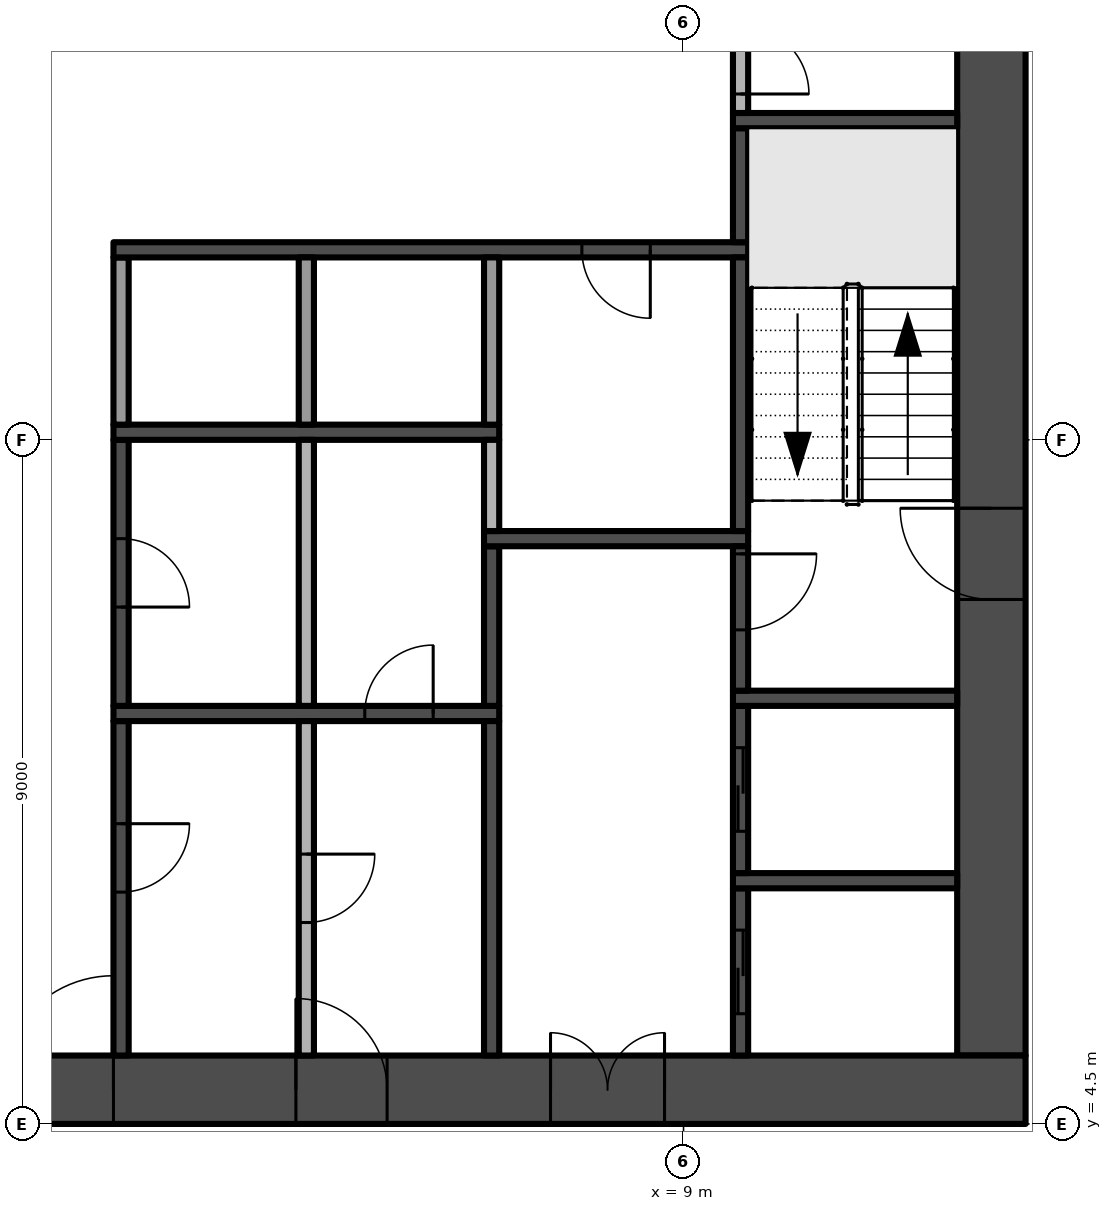
"""IFC4 building model, lengths in metres.
Left out: names, types, materials, properties, quantities, classifications, styles, units other than length and angle.
Written with IfcOpenShell. Run it as: python <this file> out.ifc"""

import sys

from ifc_helpers import new_model, si_unit, direction, frame, frame_2d, origin, place, context, subcontext, project, spatial, rectangle, extrude, element, fill, save


model = new_model("IFC4")
c1 = context("Model", 3, precision=1e-05, world=origin(), true_north=direction((0.0, 1.0)))
c2 = subcontext(c1, "Body", "Model", "MODEL_VIEW")
j1 = project(units=[si_unit("LENGTHUNIT", "METRE"), si_unit("PLANEANGLEUNIT", "RADIAN")], contexts=[c1])
p1 = place(None, origin())
s1 = spatial("IfcSite", under=j1, at=p1, CompositionType="ELEMENT")
p2 = place(p1, origin())
s2 = spatial("IfcBuilding", under=s1, at=p2, CompositionType="ELEMENT")
p3 = place(p2, frame((0.0, 0.0, 37.8)))
s3 = spatial("IfcBuildingStorey", under=s2, at=p3, CompositionType="ELEMENT", Elevation=37.8)
p4 = place(p3, frame((-13.5, 4.95, -0.3), z_axis=(0.0, 0.0, 1.0), x_axis=(1.0, 0.0, 0.0)))
e1 = element("IfcWall", 1, at=p4, inside=s3, PredefinedType="SHEAR", context=c2, shape_type="SweptSolid", body=[
    extrude(rectangle(XDim=27.0, YDim=0.9, at=frame_2d((13.5, 0.0))), origin(), (0.0, 0.0, 1.0), 3.8),
])
p5 = place(p4, frame((12.0, 0.0, 0.3)))
e2 = element("IfcOpeningElement", 2, at=p5, cuts=e1, PredefinedType="OPENING", context=c2, shape_type="SweptSolid", body=[
    extrude(rectangle(XDim=3.0, YDim=2.4, at=frame_2d((1.5, 1.2))), frame((0.0, 0.46, 0.0), z_axis=(0.0, -1.0, 0.0), x_axis=(1.0, 0.0, 0.0)), (0.0, 0.0, 1.0), 0.92),
])
p6 = place(p4, frame((4.9, 0.0, 0.3)))
e3 = element("IfcOpeningElement", 3, at=p6, cuts=e1, PredefinedType="OPENING", context=c2, shape_type="SweptSolid", body=[
    extrude(rectangle(XDim=1.2, YDim=2.2, at=frame_2d((0.6, 1.1))), frame((0.0, 0.46, 0.0), z_axis=(0.0, -1.0, 0.0), x_axis=(1.0, 0.0, 0.0)), (0.0, 0.0, 1.0), 0.92),
])
p7 = place(p4, frame((20.75, 0.0, 0.3)))
e4 = element("IfcOpeningElement", 4, at=p7, cuts=e1, PredefinedType="OPENING", context=c2, shape_type="SweptSolid", body=[
    extrude(rectangle(XDim=1.5, YDim=2.2, at=frame_2d((0.75, 1.1))), frame((0.0, 0.46, 0.0), z_axis=(0.0, -1.0, 0.0), x_axis=(1.0, 0.0, 0.0)), (0.0, 0.0, 1.0), 0.92),
])
p8 = place(p4, frame((17.4, 0.0, 0.3)))
e5 = element("IfcOpeningElement", 5, at=p8, cuts=e1, PredefinedType="OPENING", context=c2, shape_type="SweptSolid", body=[
    extrude(rectangle(XDim=1.2, YDim=2.2, at=frame_2d((0.6, 1.1))), frame((0.0, 0.46, 0.0), z_axis=(0.0, -1.0, 0.0), x_axis=(1.0, 0.0, 0.0)), (0.0, 0.0, 1.0), 0.92),
])
p9 = place(p3, frame((13.05, 5.4, -0.3), z_axis=(0.0, 0.0, 1.0), x_axis=(0.0, 1.0, 0.0)))
e6 = element("IfcWall", 6, at=p9, inside=s3, PredefinedType="SHEAR", context=c2, shape_type="SweptSolid", body=[
    extrude(rectangle(XDim=16.2, YDim=0.9, at=frame_2d((8.1, 0.0))), origin(), (0.0, 0.0, 1.0), 3.8),
])
p10 = place(p9, frame((6.0, 0.0, 0.3)))
e7 = element("IfcOpeningElement", 7, at=p10, cuts=e6, PredefinedType="OPENING", context=c2, shape_type="SweptSolid", body=[
    extrude(rectangle(XDim=1.2, YDim=2.2, at=frame_2d((0.6, 1.1))), frame((0.0, 0.46, 0.0), z_axis=(0.0, -1.0, 0.0), x_axis=(1.0, 0.0, 0.0)), (0.0, 0.0, 1.0), 0.92),
])
p11 = place(p3, frame((1.6, 9.8, 0.0), z_axis=(0.0, 0.0, 1.0), x_axis=(0.0, -1.0, 0.0)))
e8 = element("IfcWall", 8, at=p11, inside=s3, PredefinedType="SHEAR", context=c2, shape_type="SweptSolid", body=[
    extrude(rectangle(XDim=4.4, YDim=0.2, at=frame_2d((2.2, 0.0))), origin(), (0.0, 0.0, 1.0), 3.5),
])
p12 = place(p11, frame((1.35, 0.0, 0.0)))
e9 = element("IfcOpeningElement", 9, at=p12, cuts=e8, PredefinedType="OPENING", context=c2, shape_type="SweptSolid", body=[
    extrude(rectangle(XDim=0.9, YDim=2.1, at=frame_2d((0.45, 1.05))), frame((0.0, 0.11, 0.0), z_axis=(0.0, -1.0, 0.0), x_axis=(1.0, 0.0, 0.0)), (0.0, 0.0, 1.0), 0.22),
])
p13 = place(p3, frame((1.5, 9.9, 0.0), z_axis=(0.0, 0.0, 1.0), x_axis=(1.0, 0.0, 0.0)))
e10 = element("IfcWall", 10, at=p13, inside=s3, PredefinedType="SHEAR", context=c2, shape_type="SweptSolid", body=[
    extrude(rectangle(XDim=5.075, YDim=0.2, at=frame_2d((2.538, 0.0))), origin(), (0.0, 0.0, 1.0), 3.5),
])
p14 = place(p13, frame((3.306, 0.0, 0.0)))
e11 = element("IfcOpeningElement", 11, at=p14, cuts=e10, PredefinedType="OPENING", context=c2, shape_type="SweptSolid", body=[
    extrude(rectangle(XDim=0.9, YDim=2.1, at=frame_2d((0.45, 1.05))), frame((0.0, 0.11, 0.0), z_axis=(0.0, -1.0, 0.0), x_axis=(1.0, 0.0, 0.0)), (0.0, 0.0, 1.0), 0.22),
])
p15 = place(p3, frame((1.6, 13.5, 0.0), z_axis=(0.0, 0.0, 1.0), x_axis=(0.0, -1.0, 0.0)))
e12 = element("IfcWall", 12, at=p15, inside=s3, PredefinedType="SHEAR", context=c2, shape_type="SweptSolid", body=[
    extrude(rectangle(XDim=3.5, YDim=0.2, at=frame_2d((1.75, 0.0))), origin(), (0.0, 0.0, 1.0), 3.5),
])
p16 = place(p15, frame((1.3, 0.0, 0.0)))
e13 = element("IfcOpeningElement", 13, at=p16, cuts=e12, PredefinedType="OPENING", context=c2, shape_type="SweptSolid", body=[
    extrude(rectangle(XDim=0.9, YDim=2.1, at=frame_2d((0.45, 1.05))), frame((0.0, 0.11, 0.0), z_axis=(0.0, -1.0, 0.0), x_axis=(1.0, 0.0, 0.0)), (0.0, 0.0, 1.0), 0.22),
])
p17 = place(p3, frame((1.5, 13.6, 0.0), z_axis=(0.0, 0.0, 1.0), x_axis=(1.0, 0.0, 0.0)))
e14 = element("IfcWall", 14, at=p17, inside=s3, PredefinedType="SHEAR", context=c2, shape_type="SweptSolid", body=[
    extrude(rectangle(XDim=5.075, YDim=0.2, at=frame_2d((2.538, 0.0))), origin(), (0.0, 0.0, 1.0), 3.5),
])
p18 = place(p3, frame((1.6, 13.7, 0.0), z_axis=(0.0, 0.0, 1.0), x_axis=(0.0, 1.0, 0.0)))
e15 = element("IfcWall", 15, at=p18, inside=s3, PredefinedType="PARTITIONING", context=c2, shape_type="SweptSolid", body=[
    extrude(rectangle(XDim=2.2, YDim=0.2, at=frame_2d((1.1, 0.0))), origin(), (0.0, 0.0, 1.0), 3.5),
])
p19 = place(p3, frame((9.85, 16.0, 0.0), z_axis=(0.0, 0.0, 1.0), x_axis=(-1.0, 0.0, 0.0)))
e16 = element("IfcWall", 16, at=p19, inside=s3, PredefinedType="SHEAR", context=c2, shape_type="SweptSolid", body=[
    extrude(rectangle(XDim=8.35, YDim=0.2, at=frame_2d((4.175, 0.0))), origin(), (0.0, 0.0, 1.0), 3.5),
])
p20 = place(p19, frame((1.288, 0.0, 0.0)))
e17 = element("IfcOpeningElement", 17, at=p20, cuts=e16, PredefinedType="OPENING", context=c2, shape_type="SweptSolid", body=[
    extrude(rectangle(XDim=0.9, YDim=2.1, at=frame_2d((0.45, 1.05))), frame((0.0, 0.11, 0.0), z_axis=(0.0, -1.0, 0.0), x_axis=(1.0, 0.0, 0.0)), (0.0, 0.0, 1.0), 0.22),
])
p21 = place(p3, frame((4.037, 9.8, 0.0), z_axis=(0.0, 0.0, 1.0), x_axis=(0.0, -1.0, 0.0)))
e18 = element("IfcWall", 18, at=p21, inside=s3, PredefinedType="PARTITIONING", context=c2, shape_type="SweptSolid", body=[
    extrude(rectangle(XDim=4.4, YDim=0.2, at=frame_2d((2.2, 0.0))), origin(), (0.0, 0.0, 1.0), 3.5),
])
p22 = place(p21, frame((1.75, 0.0, 0.0)))
e19 = element("IfcOpeningElement", 19, at=p22, cuts=e18, PredefinedType="OPENING", context=c2, shape_type="SweptSolid", body=[
    extrude(rectangle(XDim=0.9, YDim=2.1, at=frame_2d((0.45, 1.05))), frame((0.0, 0.11, 0.0), z_axis=(0.0, -1.0, 0.0), x_axis=(1.0, 0.0, 0.0)), (0.0, 0.0, 1.0), 0.22),
])
p23 = place(p3, frame((4.037, 10.0, 0.0), z_axis=(0.0, 0.0, 1.0), x_axis=(0.0, 1.0, 0.0)))
e20 = element("IfcWall", 20, at=p23, inside=s3, PredefinedType="PARTITIONING", context=c2, shape_type="SweptSolid", body=[
    extrude(rectangle(XDim=3.5, YDim=0.2, at=frame_2d((1.75, 0.0))), origin(), (0.0, 0.0, 1.0), 3.5),
])
p24 = place(p3, frame((4.037, 13.7, 0.0), z_axis=(0.0, 0.0, 1.0), x_axis=(0.0, 1.0, 0.0)))
e21 = element("IfcWall", 21, at=p24, inside=s3, PredefinedType="PARTITIONING", context=c2, shape_type="SweptSolid", body=[
    extrude(rectangle(XDim=2.2, YDim=0.2, at=frame_2d((1.1, 0.0))), origin(), (0.0, 0.0, 1.0), 3.5),
])
p25 = place(p3, frame((6.475, 5.4, 0.0), z_axis=(0.0, 0.0, 1.0), x_axis=(0.0, 1.0, 0.0)))
e22 = element("IfcWall", 22, at=p25, inside=s3, PredefinedType="SHEAR", context=c2, shape_type="SweptSolid", body=[
    extrude(rectangle(XDim=4.4, YDim=0.2, at=frame_2d((2.2, 0.0))), origin(), (0.0, 0.0, 1.0), 3.5),
])
p26 = place(p3, frame((6.475, 10.0, 0.0), z_axis=(0.0, 0.0, 1.0), x_axis=(0.0, 1.0, 0.0)))
e23 = element("IfcWall", 23, at=p26, inside=s3, PredefinedType="SHEAR", context=c2, shape_type="SweptSolid", body=[
    extrude(rectangle(XDim=2.1, YDim=0.2, at=frame_2d((1.05, 0.0))), origin(), (0.0, 0.0, 1.0), 3.5),
])
p27 = place(p3, frame((6.375, 12.2, 0.0), z_axis=(0.0, 0.0, 1.0), x_axis=(1.0, 0.0, 0.0)))
e24 = element("IfcWall", 24, at=p27, inside=s3, PredefinedType="SHEAR", context=c2, shape_type="SweptSolid", body=[
    extrude(rectangle(XDim=3.475, YDim=0.2, at=frame_2d((1.738, 0.0))), origin(), (0.0, 0.0, 1.0), 3.5),
])
p28 = place(p3, frame((6.475, 12.3, 0.0), z_axis=(0.0, 0.0, 1.0), x_axis=(0.0, 1.0, 0.0)))
e25 = element("IfcWall", 25, at=p28, inside=s3, PredefinedType="PARTITIONING", context=c2, shape_type="SweptSolid", body=[
    extrude(rectangle(XDim=1.2, YDim=0.2, at=frame_2d((0.6, 0.0))), origin(), (0.0, 0.0, 1.0), 3.5),
])
p29 = place(p3, frame((6.475, 13.7, 0.0), z_axis=(0.0, 0.0, 1.0), x_axis=(0.0, 1.0, 0.0)))
e26 = element("IfcWall", 26, at=p29, inside=s3, PredefinedType="PARTITIONING", context=c2, shape_type="SweptSolid", body=[
    extrude(rectangle(XDim=2.2, YDim=0.2, at=frame_2d((1.1, 0.0))), origin(), (0.0, 0.0, 1.0), 3.5),
])
p30 = place(p3, frame((9.75, 5.4, 0.0), z_axis=(0.0, 0.0, 1.0), x_axis=(0.0, 1.0, 0.0)))
e27 = element("IfcWall", 27, at=p30, inside=s3, PredefinedType="SHEAR", context=c2, shape_type="SweptSolid", body=[
    extrude(rectangle(XDim=2.2, YDim=0.2, at=frame_2d((1.1, 0.0))), origin(), (0.0, 0.0, 1.0), 3.5),
])
p31 = place(p30, frame((0.55, 0.0, 0.0)))
e28 = element("IfcOpeningElement", 28, at=p31, cuts=e27, PredefinedType="OPENING", context=c2, shape_type="SweptSolid", body=[
    extrude(rectangle(XDim=1.1, YDim=2.1, at=frame_2d((0.55, 1.05))), frame((0.0, 0.11, 0.0), z_axis=(0.0, -1.0, 0.0), x_axis=(1.0, 0.0, 0.0)), (0.0, 0.0, 1.0), 0.22),
])
p32 = place(p3, frame((9.65, 7.7, 0.0), z_axis=(0.0, 0.0, 1.0), x_axis=(1.0, 0.0, 0.0)))
e29 = element("IfcWall", 29, at=p32, inside=s3, PredefinedType="SHEAR", context=c2, shape_type="SweptSolid", body=[
    extrude(rectangle(XDim=2.95, YDim=0.2, at=frame_2d((1.475, 0.0))), origin(), (0.0, 0.0, 1.0), 3.5),
])
p33 = place(p3, frame((9.75, 7.8, 0.0), z_axis=(0.0, 0.0, 1.0), x_axis=(0.0, 1.0, 0.0)))
e30 = element("IfcWall", 30, at=p33, inside=s3, PredefinedType="SHEAR", context=c2, shape_type="SweptSolid", body=[
    extrude(rectangle(XDim=2.2, YDim=0.2, at=frame_2d((1.1, 0.0))), origin(), (0.0, 0.0, 1.0), 3.5),
])
p34 = place(p33, frame((0.55, 0.0, 0.0)))
e31 = element("IfcOpeningElement", 31, at=p34, cuts=e30, PredefinedType="OPENING", context=c2, shape_type="SweptSolid", body=[
    extrude(rectangle(XDim=1.1, YDim=2.1, at=frame_2d((0.55, 1.05))), frame((0.0, 0.11, 0.0), z_axis=(0.0, -1.0, 0.0), x_axis=(1.0, 0.0, 0.0)), (0.0, 0.0, 1.0), 0.22),
])
p35 = place(p3, frame((9.65, 10.1, 0.0), z_axis=(0.0, 0.0, 1.0), x_axis=(1.0, 0.0, 0.0)))
e32 = element("IfcWall", 32, at=p35, inside=s3, PredefinedType="SHEAR", context=c2, shape_type="SweptSolid", body=[
    extrude(rectangle(XDim=2.95, YDim=0.2, at=frame_2d((1.475, 0.0))), origin(), (0.0, 0.0, 1.0), 3.5),
])
p36 = place(p3, frame((9.75, 12.1, 0.0), z_axis=(0.0, 0.0, 1.0), x_axis=(0.0, -1.0, 0.0)))
e33 = element("IfcWall", 33, at=p36, inside=s3, PredefinedType="SHEAR", context=c2, shape_type="SweptSolid", body=[
    extrude(rectangle(XDim=1.9, YDim=0.2, at=frame_2d((0.95, 0.0))), origin(), (0.0, 0.0, 1.0), 3.5),
])
p37 = place(p36, frame((0.1, 0.0, 0.0)))
e34 = element("IfcOpeningElement", 34, at=p37, cuts=e33, PredefinedType="OPENING", context=c2, shape_type="SweptSolid", body=[
    extrude(rectangle(XDim=1.0, YDim=2.2, at=frame_2d((0.5, 1.1))), frame((0.0, 0.11, 0.0), z_axis=(0.0, -1.0, 0.0), x_axis=(1.0, 0.0, 0.0)), (0.0, 0.0, 1.0), 0.22),
])
p38 = place(p3, frame((9.75, 12.3, 0.0), z_axis=(0.0, 0.0, 1.0), x_axis=(0.0, 1.0, 0.0)))
e35 = element("IfcWall", 35, at=p38, inside=s3, PredefinedType="SHEAR", context=c2, shape_type="SweptSolid", body=[
    extrude(rectangle(XDim=3.6, YDim=0.2, at=frame_2d((1.8, 0.0))), origin(), (0.0, 0.0, 1.0), 3.5),
])
p39 = place(p3, frame((9.75, 16.1, 0.0), z_axis=(0.0, 0.0, 1.0), x_axis=(0.0, 1.0, 0.0)))
e36 = element("IfcWall", 36, at=p39, inside=s3, PredefinedType="SHEAR", context=c2, shape_type="SweptSolid", body=[
    extrude(rectangle(XDim=1.5, YDim=0.2, at=frame_2d((0.75, 0.0))), origin(), (0.0, 0.0, 1.0), 3.5),
])
p40 = place(p3, frame((9.65, 17.7, 0.0), z_axis=(0.0, 0.0, 1.0), x_axis=(1.0, 0.0, 0.0)))
e37 = element("IfcWall", 37, at=p40, inside=s3, PredefinedType="SHEAR", context=c2, shape_type="SweptSolid", body=[
    extrude(rectangle(XDim=2.95, YDim=0.2, at=frame_2d((1.475, 0.0))), origin(), (0.0, 0.0, 1.0), 3.5),
])
p41 = place(p3, frame((9.75, 19.2, 0.0), z_axis=(0.0, 0.0, 1.0), x_axis=(0.0, -1.0, 0.0)))
e38 = element("IfcWall", 38, at=p41, inside=s3, PredefinedType="PARTITIONING", context=c2, shape_type="SweptSolid", body=[
    extrude(rectangle(XDim=1.4, YDim=0.2, at=frame_2d((0.7, 0.0))), origin(), (0.0, 0.0, 1.0), 3.5),
])
p42 = place(p41, frame((0.25, 0.0, 0.0)))
e39 = element("IfcOpeningElement", 39, at=p42, cuts=e38, PredefinedType="OPENING", context=c2, shape_type="SweptSolid", body=[
    extrude(rectangle(XDim=0.9, YDim=2.1, at=frame_2d((0.45, 1.05))), frame((0.0, 0.11, 0.0), z_axis=(0.0, -1.0, 0.0), x_axis=(1.0, 0.0, 0.0)), (0.0, 0.0, 1.0), 0.22),
])
p43 = place(p5, frame((3.0, 0.0, 0.0), z_axis=(0.0, 0.0, 1.0), x_axis=(-1.0, 0.0, 0.0)))
e40 = element("IfcDoor", 40, at=p43, inside=s3, OperationType="DOUBLE_DOOR_SINGLE_SWING", PredefinedType="DOOR", context=c2, shape_type="SweptSolid", body=[
    extrude(rectangle(XDim=3.0, YDim=2.4, at=frame_2d((1.5, 1.2))), frame((0.0, 0.025, 0.0), z_axis=(0.0, -1.0, 0.0), x_axis=(1.0, 0.0, 0.0)), (0.0, 0.0, 1.0), 0.05),
])
fill(e2, e40)
p44 = place(p10, frame((1.2, 0.0, 0.0), z_axis=(0.0, 0.0, 1.0), x_axis=(-1.0, 0.0, 0.0)))
e41 = element("IfcDoor", 41, at=p44, inside=s3, OperationType="SINGLE_SWING_LEFT", PredefinedType="DOOR", context=c2, shape_type="SweptSolid", body=[
    extrude(rectangle(XDim=1.2, YDim=2.2, at=frame_2d((0.6, 1.1))), frame((0.0, 0.025, 0.0), z_axis=(0.0, -1.0, 0.0), x_axis=(1.0, 0.0, 0.0)), (0.0, 0.0, 1.0), 0.05),
])
fill(e7, e41)
p45 = place(p7, frame((1.5, 0.0, 0.0), z_axis=(0.0, 0.0, 1.0), x_axis=(-1.0, 0.0, 0.0)))
e42 = element("IfcDoor", 42, at=p45, inside=s3, OperationType="DOUBLE_DOOR_SINGLE_SWING", PredefinedType="DOOR", context=c2, shape_type="SweptSolid", body=[
    extrude(rectangle(XDim=1.5, YDim=2.2, at=frame_2d((0.75, 1.1))), frame((0.0, 0.025, 0.0), z_axis=(0.0, -1.0, 0.0), x_axis=(1.0, 0.0, 0.0)), (0.0, 0.0, 1.0), 0.05),
])
fill(e4, e42)
p46 = place(p8, frame((1.2, 0.0, 0.0), z_axis=(0.0, 0.0, 1.0), x_axis=(-1.0, 0.0, 0.0)))
e43 = element("IfcDoor", 43, at=p46, inside=s3, OperationType="SINGLE_SWING_RIGHT", PredefinedType="DOOR", context=c2, shape_type="SweptSolid", body=[
    extrude(rectangle(XDim=1.2, YDim=2.2, at=frame_2d((0.6, 1.1))), frame((0.0, 0.025, 0.0), z_axis=(0.0, -1.0, 0.0), x_axis=(1.0, 0.0, 0.0)), (0.0, 0.0, 1.0), 0.05),
])
fill(e5, e43)
p47 = place(p37, origin())
e44 = element("IfcDoor", 44, at=p47, inside=s3, OperationType="SINGLE_SWING_LEFT", PredefinedType="DOOR", context=c2, shape_type="SweptSolid", body=[
    extrude(rectangle(XDim=1.0, YDim=2.2, at=frame_2d((0.5, 1.1))), frame((0.0, 0.025, 0.0), z_axis=(0.0, -1.0, 0.0), x_axis=(1.0, 0.0, 0.0)), (0.0, 0.0, 1.0), 0.05),
])
fill(e34, e44)
p48 = place(p31, origin())
e45 = element("IfcDoor", 45, at=p48, inside=s3, OperationType="SLIDING_TO_RIGHT", PredefinedType="DOOR", context=c2, shape_type="SweptSolid", body=[
    extrude(rectangle(XDim=1.1, YDim=2.1, at=frame_2d((0.55, 1.05))), frame((0.0, 0.025, 0.0), z_axis=(0.0, -1.0, 0.0), x_axis=(1.0, 0.0, 0.0)), (0.0, 0.0, 1.0), 0.05),
])
fill(e28, e45)
p49 = place(p34, origin())
e46 = element("IfcDoor", 46, at=p49, inside=s3, OperationType="SLIDING_TO_RIGHT", PredefinedType="DOOR", context=c2, shape_type="SweptSolid", body=[
    extrude(rectangle(XDim=1.1, YDim=2.1, at=frame_2d((0.55, 1.05))), frame((0.0, 0.025, 0.0), z_axis=(0.0, -1.0, 0.0), x_axis=(1.0, 0.0, 0.0)), (0.0, 0.0, 1.0), 0.05),
])
fill(e31, e46)
p50 = place(p12, origin())
e47 = element("IfcDoor", 47, at=p50, inside=s3, OperationType="SINGLE_SWING_LEFT", PredefinedType="DOOR", context=c2, shape_type="SweptSolid", body=[
    extrude(rectangle(XDim=0.9, YDim=2.1, at=frame_2d((0.45, 1.05))), frame((0.0, 0.025, 0.0), z_axis=(0.0, -1.0, 0.0), x_axis=(1.0, 0.0, 0.0)), (0.0, 0.0, 1.0), 0.05),
])
fill(e9, e47)
p51 = place(p22, origin())
e48 = element("IfcDoor", 48, at=p51, inside=s3, OperationType="SINGLE_SWING_LEFT", PredefinedType="DOOR", context=c2, shape_type="SweptSolid", body=[
    extrude(rectangle(XDim=0.9, YDim=2.1, at=frame_2d((0.45, 1.05))), frame((0.0, 0.025, 0.0), z_axis=(0.0, -1.0, 0.0), x_axis=(1.0, 0.0, 0.0)), (0.0, 0.0, 1.0), 0.05),
])
fill(e19, e48)
p52 = place(p16, origin())
e49 = element("IfcDoor", 49, at=p52, inside=s3, OperationType="SINGLE_SWING_RIGHT", PredefinedType="DOOR", context=c2, shape_type="SweptSolid", body=[
    extrude(rectangle(XDim=0.9, YDim=2.1, at=frame_2d((0.45, 1.05))), frame((0.0, 0.025, 0.0), z_axis=(0.0, -1.0, 0.0), x_axis=(1.0, 0.0, 0.0)), (0.0, 0.0, 1.0), 0.05),
])
fill(e13, e49)
p53 = place(p14, origin())
e50 = element("IfcDoor", 50, at=p53, inside=s3, OperationType="SINGLE_SWING_RIGHT", PredefinedType="DOOR", context=c2, shape_type="SweptSolid", body=[
    extrude(rectangle(XDim=0.9, YDim=2.1, at=frame_2d((0.45, 1.05))), frame((0.0, 0.025, 0.0), z_axis=(0.0, -1.0, 0.0), x_axis=(1.0, 0.0, 0.0)), (0.0, 0.0, 1.0), 0.05),
])
fill(e11, e50)
p54 = place(p20, origin())
e51 = element("IfcDoor", 51, at=p54, inside=s3, OperationType="SINGLE_SWING_LEFT", PredefinedType="DOOR", context=c2, shape_type="SweptSolid", body=[
    extrude(rectangle(XDim=0.9, YDim=2.1, at=frame_2d((0.45, 1.05))), frame((0.0, 0.025, 0.0), z_axis=(0.0, -1.0, 0.0), x_axis=(1.0, 0.0, 0.0)), (0.0, 0.0, 1.0), 0.05),
])
fill(e17, e51)
p55 = place(p42, origin())
e52 = element("IfcDoor", 52, at=p55, inside=s3, OperationType="SINGLE_SWING_RIGHT", PredefinedType="DOOR", context=c2, shape_type="SweptSolid", body=[
    extrude(rectangle(XDim=0.9, YDim=2.1, at=frame_2d((0.45, 1.05))), frame((0.0, 0.025, 0.0), z_axis=(0.0, -1.0, 0.0), x_axis=(1.0, 0.0, 0.0)), (0.0, 0.0, 1.0), 0.05),
])
fill(e39, e52)
save(model, sys.argv[1])
